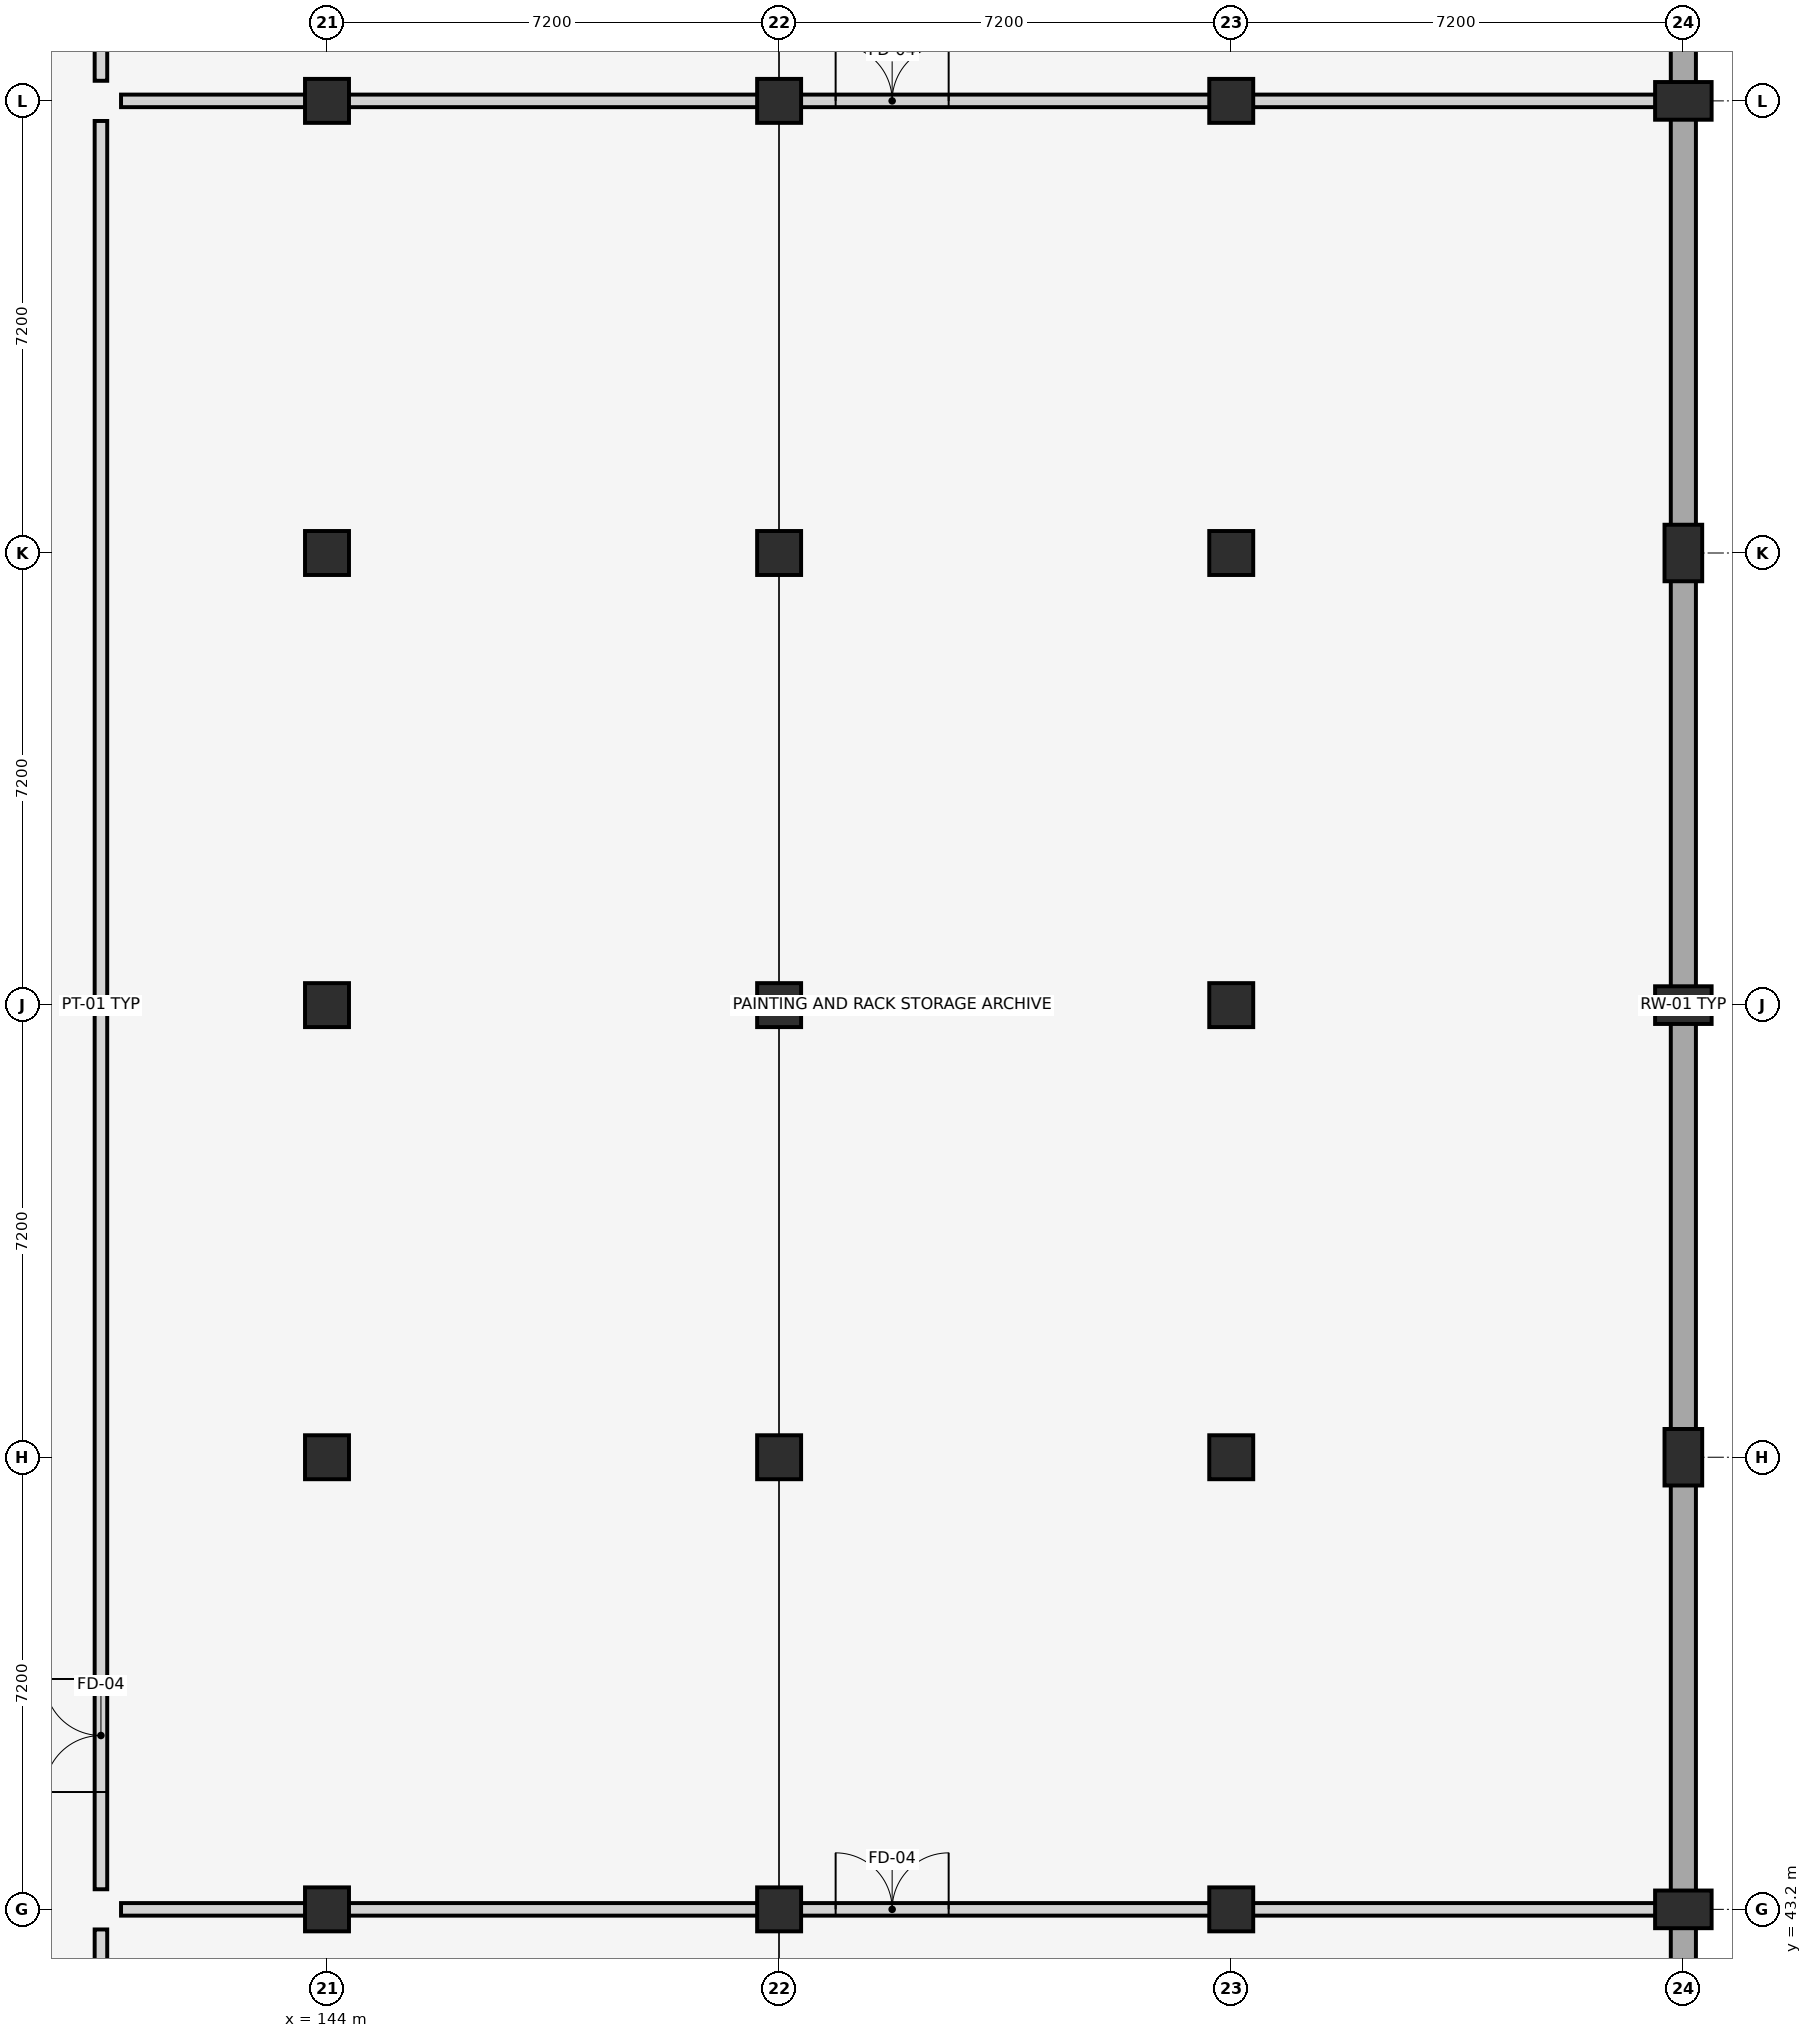
"""IFC4 building model, lengths in metres.
Left out: names, types, materials, properties, quantities, classifications, styles, units other than length and angle.
Written with IfcOpenShell. Run it as: python <this file> out.ifc"""

import sys

from ifc_helpers import new_model, si_unit, direction, frame, frame_2d, origin, origin_2d, place, context, subcontext, project, spatial, rectangle, extrude, element, fill, save


model = new_model("IFC4")
c1 = context("Model", 3, precision=1e-05, world=origin(), true_north=direction((0.0, 1.0)))
c2 = subcontext(c1, "Body", "Model", "MODEL_VIEW")
j1 = project(units=[si_unit("LENGTHUNIT", "METRE"), si_unit("PLANEANGLEUNIT", "RADIAN")], contexts=[c1])
p1 = place(None, origin())
s1 = spatial("IfcSite", under=j1, at=p1, CompositionType="ELEMENT")
p2 = place(p1, origin())
s2 = spatial("IfcBuilding", under=s1, at=p2, CompositionType="ELEMENT")
p3 = place(p2, frame((0.0, 0.0, -4.5)))
s3 = spatial("IfcBuildingStorey", under=s2, at=p3, CompositionType="ELEMENT", Elevation=-4.5)
p4 = place(p3, frame((165.6, 14.6, 0.0), z_axis=(0.0, 0.0, 1.0), x_axis=(0.0, 1.0, 0.0)))
e1 = element("IfcWall", 1, at=p4, inside=s3, PredefinedType="USERDEFINED", context=c2, shape_type="SweptSolid", body=[
    extrude(rectangle(XDim=86.0, YDim=0.4, at=frame_2d((43.0, 0.0))), origin(), (0.0, 0.0, 1.0), 3.67),
])
for number, where, z_axis, x_axis in (
    (2, (144.0, 43.2, -0.45), (0.0, 0.0, 1.0), (1.0, 0.0, 0.0)),
    (3, (144.0, 50.4, -0.45), (0.0, 0.0, 1.0), (0.0, 1.0, 0.0)),
    (4, (144.0, 57.6, -0.45), (0.0, 0.0, 1.0), (1.0, 0.0, 0.0)),
    (5, (144.0, 64.8, -0.45), (0.0, 0.0, 1.0), (0.0, 1.0, 0.0)),
    (6, (144.0, 72.0, -0.45), (0.0, 0.0, 1.0), (1.0, 0.0, 0.0)),
    (7, (151.2, 43.2, -0.45), (0.0, 0.0, 1.0), (0.0, 1.0, 0.0)),
    (8, (151.2, 50.4, -0.45), (0.0, 0.0, 1.0), (1.0, 0.0, 0.0)),
    (9, (151.2, 57.6, -0.45), (0.0, 0.0, 1.0), (0.0, 1.0, 0.0)),
    (10, (151.2, 64.8, -0.45), (0.0, 0.0, 1.0), (1.0, 0.0, 0.0)),
    (11, (151.2, 72.0, -0.45), (0.0, 0.0, 1.0), (0.0, 1.0, 0.0)),
    (12, (158.4, 43.2, -0.45), (0.0, 0.0, 1.0), (1.0, 0.0, 0.0)),
    (13, (158.4, 50.4, -0.45), (0.0, 0.0, 1.0), (0.0, 1.0, 0.0)),
    (14, (158.4, 57.6, -0.45), (0.0, 0.0, 1.0), (1.0, 0.0, 0.0)),
    (15, (158.4, 64.8, -0.45), (0.0, 0.0, 1.0), (0.0, 1.0, 0.0)),
    (16, (158.4, 72.0, -0.45), (0.0, 0.0, 1.0), (1.0, 0.0, 0.0)),
):
    element("IfcColumn", number, at=place(p3, frame(where, z_axis=z_axis, x_axis=x_axis)), inside=s3, PredefinedType="COLUMN", context=c2, shape_type="SweptSolid", body=[
        extrude(rectangle(XDim=0.7, YDim=0.7, at=origin_2d()), origin(), (0.0, 0.0, 1.0), 4.95),
    ])
for number, where, z_axis, x_axis in (
    (17, (165.6, 43.2, -0.45), (0.0, 0.0, 1.0), (0.0, 1.0, 0.0)),
    (18, (165.6, 50.4, -0.45), (0.0, 0.0, 1.0), (1.0, 0.0, 0.0)),
    (19, (165.6, 57.6, -0.45), (0.0, 0.0, 1.0), (0.0, 1.0, 0.0)),
    (20, (165.6, 64.8, -0.45), (0.0, 0.0, 1.0), (1.0, 0.0, 0.0)),
    (21, (165.6, 72.0, -0.45), (0.0, 0.0, 1.0), (0.0, 1.0, 0.0)),
):
    element("IfcColumn", number, at=place(p3, frame(where, z_axis=z_axis, x_axis=x_axis)), inside=s3, PredefinedType="PILASTER", context=c2, shape_type="SweptSolid", body=[
        extrude(rectangle(XDim=0.6, YDim=0.9, at=origin_2d()), origin(), (0.0, 0.0, 1.0), 4.95),
    ])
p5 = place(p3, frame((140.4, 14.72, 0.0), z_axis=(0.0, 0.0, 1.0), x_axis=(0.0, 1.0, 0.0)))
e22 = element("IfcWall", 22, at=p5, inside=s3, PredefinedType="PARTITIONING", context=c2, shape_type="SweptSolid", body=[
    extrude(rectangle(XDim=28.16, YDim=0.2, at=frame_2d((14.08, 0.0))), origin(), (0.0, 0.0, 1.0), 3.45),
])
p6 = place(p5, frame((1.549, 0.0, 0.0)))
e23 = element("IfcOpeningElement", 23, at=p6, cuts=e22, PredefinedType="OPENING", context=c2, shape_type="SweptSolid", body=[
    extrude(rectangle(XDim=1.8, YDim=2.4, at=frame_2d((0.9, 1.2))), frame((0.0, 0.11, 0.0), z_axis=(0.0, -1.0, 0.0), x_axis=(1.0, 0.0, 0.0)), (0.0, 0.0, 1.0), 0.22),
])
p7 = place(p3, frame((140.4, 43.52, 0.0), z_axis=(0.0, 0.0, 1.0), x_axis=(0.0, 1.0, 0.0)))
e24 = element("IfcWall", 24, at=p7, inside=s3, PredefinedType="PARTITIONING", context=c2, shape_type="SweptSolid", body=[
    extrude(rectangle(XDim=28.16, YDim=0.2, at=frame_2d((14.08, 0.0))), origin(), (0.0, 0.0, 1.0), 3.45),
])
p8 = place(p7, frame((1.549, 0.0, 0.0)))
e25 = element("IfcOpeningElement", 25, at=p8, cuts=e24, PredefinedType="OPENING", context=c2, shape_type="SweptSolid", body=[
    extrude(rectangle(XDim=1.8, YDim=2.4, at=frame_2d((0.9, 1.2))), frame((0.0, 0.11, 0.0), z_axis=(0.0, -1.0, 0.0), x_axis=(1.0, 0.0, 0.0)), (0.0, 0.0, 1.0), 0.22),
])
p9 = place(p3, frame((140.4, 72.32, 0.0), z_axis=(0.0, 0.0, 1.0), x_axis=(0.0, 1.0, 0.0)))
e26 = element("IfcWall", 26, at=p9, inside=s3, PredefinedType="PARTITIONING", context=c2, shape_type="SweptSolid", body=[
    extrude(rectangle(XDim=28.16, YDim=0.2, at=frame_2d((14.08, 0.0))), origin(), (0.0, 0.0, 1.0), 3.45),
])
p10 = place(p9, frame((1.549, 0.0, 0.0)))
e27 = element("IfcOpeningElement", 27, at=p10, cuts=e26, PredefinedType="OPENING", context=c2, shape_type="SweptSolid", body=[
    extrude(rectangle(XDim=1.8, YDim=2.4, at=frame_2d((0.9, 1.2))), frame((0.0, 0.11, 0.0), z_axis=(0.0, -1.0, 0.0), x_axis=(1.0, 0.0, 0.0)), (0.0, 0.0, 1.0), 0.22),
])
p11 = place(p3, frame((140.72, 43.2, 0.0), z_axis=(0.0, 0.0, 1.0), x_axis=(1.0, 0.0, 0.0)))
e28 = element("IfcWall", 28, at=p11, inside=s3, PredefinedType="PARTITIONING", context=c2, shape_type="SweptSolid", body=[
    extrude(rectangle(XDim=24.56, YDim=0.2, at=frame_2d((12.28, 0.0))), origin(), (0.0, 0.0, 1.0), 3.45),
])
p12 = place(p11, frame((11.38, 0.0, 0.0)))
e29 = element("IfcOpeningElement", 29, at=p12, cuts=e28, PredefinedType="OPENING", context=c2, shape_type="SweptSolid", body=[
    extrude(rectangle(XDim=1.8, YDim=2.4, at=frame_2d((0.9, 1.2))), frame((0.0, 0.11, 0.0), z_axis=(0.0, -1.0, 0.0), x_axis=(1.0, 0.0, 0.0)), (0.0, 0.0, 1.0), 0.22),
])
p13 = place(p3, frame((140.72, 72.0, 0.0), z_axis=(0.0, 0.0, 1.0), x_axis=(1.0, 0.0, 0.0)))
e30 = element("IfcWall", 30, at=p13, inside=s3, PredefinedType="PARTITIONING", context=c2, shape_type="SweptSolid", body=[
    extrude(rectangle(XDim=24.56, YDim=0.2, at=frame_2d((12.28, 0.0))), origin(), (0.0, 0.0, 1.0), 3.45),
])
p14 = place(p13, frame((11.38, 0.0, 0.0)))
e31 = element("IfcOpeningElement", 31, at=p14, cuts=e30, PredefinedType="OPENING", context=c2, shape_type="SweptSolid", body=[
    extrude(rectangle(XDim=1.8, YDim=2.4, at=frame_2d((0.9, 1.2))), frame((0.0, 0.11, 0.0), z_axis=(0.0, -1.0, 0.0), x_axis=(1.0, 0.0, 0.0)), (0.0, 0.0, 1.0), 0.22),
])
p15 = place(p8, origin())
e32 = element("IfcDoor", 32, at=p15, inside=s3, OperationType="DOUBLE_DOOR_SINGLE_SWING", PredefinedType="DOOR", context=c2, shape_type="SweptSolid", body=[
    extrude(rectangle(XDim=1.8, YDim=2.4, at=frame_2d((0.9, 1.2))), frame((0.0, 0.025, 0.0), z_axis=(0.0, -1.0, 0.0), x_axis=(1.0, 0.0, 0.0)), (0.0, 0.0, 1.0), 0.05),
])
fill(e25, e32)
p16 = place(p12, origin())
e33 = element("IfcDoor", 33, at=p16, inside=s3, OperationType="DOUBLE_DOOR_SINGLE_SWING", PredefinedType="DOOR", context=c2, shape_type="SweptSolid", body=[
    extrude(rectangle(XDim=1.8, YDim=2.4, at=frame_2d((0.9, 1.2))), frame((0.0, 0.025, 0.0), z_axis=(0.0, -1.0, 0.0), x_axis=(1.0, 0.0, 0.0)), (0.0, 0.0, 1.0), 0.05),
])
fill(e29, e33)
p17 = place(p14, origin())
e34 = element("IfcDoor", 34, at=p17, inside=s3, OperationType="DOUBLE_DOOR_SINGLE_SWING", PredefinedType="DOOR", context=c2, shape_type="SweptSolid", body=[
    extrude(rectangle(XDim=1.8, YDim=2.4, at=frame_2d((0.9, 1.2))), frame((0.0, 0.025, 0.0), z_axis=(0.0, -1.0, 0.0), x_axis=(1.0, 0.0, 0.0)), (0.0, 0.0, 1.0), 0.05),
])
fill(e31, e34)
save(model, sys.argv[1])
